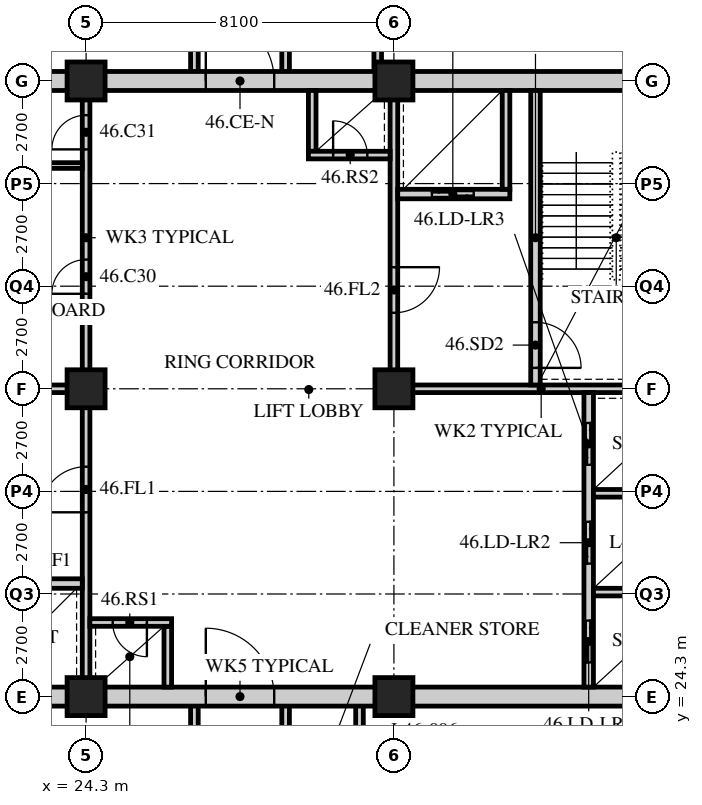
"""IFC4 building model, lengths in metres.
Left out: names, types, materials, properties, quantities, classifications, styles, units other than length and angle.
Written with IfcOpenShell. Run it as: python <this file> out.ifc"""

import sys

from ifc_helpers import new_model, si_unit, direction, frame, frame_2d, origin, origin_2d, place, context, subcontext, project, spatial, rectangle, hollow_rectangle, extrude, element, fill, save


model = new_model("IFC4")
c1 = context("Model", 3, precision=1e-05, world=origin(), true_north=direction((0.0, 1.0)))
c2 = subcontext(c1, "Body", "Model", "MODEL_VIEW")
j1 = project(units=[si_unit("LENGTHUNIT", "METRE"), si_unit("PLANEANGLEUNIT", "RADIAN")], contexts=[c1])
p1 = place(None, origin())
s1 = spatial("IfcSite", under=j1, at=p1, CompositionType="ELEMENT")
p2 = place(p1, origin())
s2 = spatial("IfcBuilding", under=s1, at=p2, CompositionType="ELEMENT")
p3 = place(p2, frame((0.0, 0.0, 181.2)))
s3 = spatial("IfcBuildingStorey", under=s2, at=p3, CompositionType="ELEMENT", Elevation=181.2)
for number, where, z_axis, x_axis in (
    (1, (24.3, 24.3, 0.0), (0.0, 0.0, 1.0), (1.0, 0.0, 0.0)),
    (2, (24.3, 32.4, 0.0), (0.0, 0.0, 1.0), (1.0, 0.0, 0.0)),
    (3, (24.3, 40.5, 0.0), (0.0, 0.0, 1.0), (1.0, 0.0, 0.0)),
    (4, (32.4, 24.3, 0.0), (0.0, 0.0, 1.0), (1.0, 0.0, 0.0)),
    (5, (32.4, 32.4, 0.0), (0.0, 0.0, 1.0), (1.0, 0.0, 0.0)),
    (6, (32.4, 40.5, 0.0), (0.0, 0.0, 1.0), (1.0, 0.0, 0.0)),
):
    element("IfcColumn", number, at=place(p3, frame(where, z_axis=z_axis, x_axis=x_axis)), inside=s3, PredefinedType="COLUMN", context=c2, shape_type="SweptSolid", body=[
        extrude(hollow_rectangle(XDim=1.0, YDim=1.0, WallThickness=0.1, at=origin_2d()), origin(), (0.0, 0.0, 1.0), 3.6),
    ])
for number, where, z_axis, x_axis in (
    (7, (31.494, 20.7, 0.0), (0.0, 0.0, 1.0), (0.0, 1.0, 0.0)),
    (8, (27.15, 20.7, 0.0), (0.0, 0.0, 1.0), (0.0, 1.0, 0.0)),
    (9, (29.55, 20.7, 0.0), (0.0, 0.0, 1.0), (0.0, 1.0, 0.0)),
):
    element("IfcWall", number, at=place(p3, frame(where, z_axis=z_axis, x_axis=x_axis)), inside=s3, PredefinedType="SOLIDWALL", context=c2, shape_type="SweptSolid", body=[
        extrude(rectangle(XDim=3.6, YDim=0.2, at=frame_2d((1.8, 0.0))), origin(), (0.0, 0.0, 1.0), 3.39),
    ])
p4 = place(p3, frame((31.974, 45.45, 0.0), z_axis=(0.0, 0.0, 1.0), x_axis=(0.0, -1.0, 0.0)))
e10 = element("IfcWall", 10, at=p4, inside=s3, PredefinedType="SOLIDWALL", context=c2, shape_type="SweptSolid", body=[
    extrude(rectangle(XDim=4.95, YDim=0.2, at=frame_2d((2.475, 0.0))), origin(), (0.0, 0.0, 1.0), 2.69),
])
for number, where, z_axis, x_axis in (
    (11, (27.15, 40.5, 0.0), (0.0, 0.0, 1.0), (0.0, 1.0, 0.0)),
    (12, (29.55, 40.5, 0.0), (0.0, 0.0, 1.0), (0.0, 1.0, 0.0)),
):
    element("IfcWall", number, at=place(p3, frame(where, z_axis=z_axis, x_axis=x_axis)), inside=s3, PredefinedType="SOLIDWALL", context=c2, shape_type="SweptSolid", body=[
        extrude(rectangle(XDim=4.95, YDim=0.2, at=frame_2d((2.475, 0.0))), origin(), (0.0, 0.0, 1.0), 3.39),
    ])
p5 = place(p3, frame((15.95, 24.3, 0.0), z_axis=(0.0, 0.0, 1.0), x_axis=(1.0, 0.0, 0.0)))
e13 = element("IfcWall", 13, at=p5, inside=s3, PredefinedType="SOLIDWALL", context=c2, shape_type="SweptSolid", body=[
    extrude(rectangle(XDim=24.8, YDim=0.5, at=frame_2d((12.4, 0.0))), origin(), (0.0, 0.0, 1.0), 2.74),
])
p6 = place(p5, frame((11.5, 0.0, 0.0)))
e14 = element("IfcOpeningElement", 14, at=p6, cuts=e13, PredefinedType="OPENING", context=c2, shape_type="SweptSolid", body=[
    extrude(rectangle(XDim=1.8, YDim=2.4, at=frame_2d((0.9, 1.2))), frame((0.0, 0.26, 0.0), z_axis=(0.0, -1.0, 0.0), x_axis=(1.0, 0.0, 0.0)), (0.0, 0.0, 1.0), 0.52),
])
p7 = place(p3, frame((15.95, 40.5, 0.0), z_axis=(0.0, 0.0, 1.0), x_axis=(1.0, 0.0, 0.0)))
e15 = element("IfcWall", 15, at=p7, inside=s3, PredefinedType="SOLIDWALL", context=c2, shape_type="SweptSolid", body=[
    extrude(rectangle(XDim=24.8, YDim=0.5, at=frame_2d((12.4, 0.0))), origin(), (0.0, 0.0, 1.0), 2.74),
])
p8 = place(p7, frame((11.5, 0.0, 0.0)))
e16 = element("IfcOpeningElement", 16, at=p8, cuts=e15, PredefinedType="OPENING", context=c2, shape_type="SweptSolid", body=[
    extrude(rectangle(XDim=1.8, YDim=2.4, at=frame_2d((0.9, 1.2))), frame((0.0, 0.26, 0.0), z_axis=(0.0, -1.0, 0.0), x_axis=(1.0, 0.0, 0.0)), (0.0, 0.0, 1.0), 0.52),
])
p9 = place(p3, frame((16.45, 32.4, 0.0), z_axis=(0.0, 0.0, 1.0), x_axis=(1.0, 0.0, 0.0)))
e17 = element("IfcWall", 17, at=p9, inside=s3, PredefinedType="SOLIDWALL", context=c2, shape_type="SweptSolid", body=[
    extrude(rectangle(XDim=7.95, YDim=0.2, at=frame_2d((3.975, 0.0))), origin(), (0.0, 0.0, 1.0), 2.778),
])
p10 = place(p3, frame((24.3, 24.55, 0.0), z_axis=(0.0, 0.0, 1.0), x_axis=(0.0, 1.0, 0.0)))
e18 = element("IfcWall", 18, at=p10, inside=s3, PredefinedType="SOLIDWALL", context=c2, shape_type="SweptSolid", body=[
    extrude(rectangle(XDim=7.75, YDim=0.2, at=frame_2d((3.875, 0.0))), origin(), (0.0, 0.0, 1.0), 2.778),
])
p11 = place(p10, frame((4.6, 0.0, 0.0)))
e19 = element("IfcOpeningElement", 19, at=p11, cuts=e18, PredefinedType="OPENING", context=c2, shape_type="SweptSolid", body=[
    extrude(rectangle(XDim=1.2, YDim=2.1, at=frame_2d((0.6, 1.05))), frame((0.0, 0.11, 0.0), z_axis=(0.0, -1.0, 0.0), x_axis=(1.0, 0.0, 0.0)), (0.0, 0.0, 1.0), 0.22),
])
p12 = place(p3, frame((21.25, 27.275, 0.0), z_axis=(0.0, 0.0, 1.0), x_axis=(1.0, 0.0, 0.0)))
e20 = element("IfcWall", 20, at=p12, inside=s3, PredefinedType="SOLIDWALL", context=c2, shape_type="SweptSolid", body=[
    extrude(rectangle(XDim=2.95, YDim=0.25, at=frame_2d((1.475, 0.0))), origin(), (0.0, 0.0, 1.0), 3.39),
])
p13 = place(p12, frame((0.95, 0.0, 0.0)))
e21 = element("IfcOpeningElement", 21, at=p13, cuts=e20, PredefinedType="OPENING", context=c2, shape_type="SweptSolid", body=[
    extrude(rectangle(XDim=1.1, YDim=2.4, at=frame_2d((0.55, 1.2))), frame((0.0, 0.135, 0.0), z_axis=(0.0, -1.0, 0.0), x_axis=(1.0, 0.0, 0.0)), (0.0, 0.0, 1.0), 0.27),
])
p14 = place(p3, frame((26.45, 24.55, 0.0), z_axis=(0.0, 0.0, 1.0), x_axis=(0.0, 1.0, 0.0)))
e22 = element("IfcWall", 22, at=p14, inside=s3, PredefinedType="SOLIDWALL", context=c2, shape_type="SweptSolid", body=[
    extrude(rectangle(XDim=1.6, YDim=0.2, at=frame_2d((0.8, 0.0))), origin(), (0.0, 0.0, 1.0), 3.39),
])
p15 = place(p3, frame((24.4, 26.25, 0.0), z_axis=(0.0, 0.0, 1.0), x_axis=(1.0, 0.0, 0.0)))
e23 = element("IfcWall", 23, at=p15, inside=s3, PredefinedType="SOLIDWALL", context=c2, shape_type="SweptSolid", body=[
    extrude(rectangle(XDim=2.15, YDim=0.2, at=frame_2d((1.075, 0.0))), origin(), (0.0, 0.0, 1.0), 3.39),
])
p16 = place(p15, frame((0.6, 0.0, 0.0)))
e24 = element("IfcOpeningElement", 24, at=p16, cuts=e23, PredefinedType="OPENING", context=c2, shape_type="SweptSolid", body=[
    extrude(rectangle(XDim=0.9, YDim=2.1, at=frame_2d((0.45, 1.05))), frame((0.0, 0.11, 0.0), z_axis=(0.0, -1.0, 0.0), x_axis=(1.0, 0.0, 0.0)), (0.0, 0.0, 1.0), 0.22),
])
p17 = place(p3, frame((32.3, 32.4, 0.0), z_axis=(0.0, 0.0, 1.0), x_axis=(1.0, 0.0, 0.0)))
e25 = element("IfcWall", 25, at=p17, inside=s3, PredefinedType="SOLIDWALL", context=c2, shape_type="SweptSolid", body=[
    extrude(rectangle(XDim=7.95, YDim=0.2, at=frame_2d((3.975, 0.0))), origin(), (0.0, 0.0, 1.0), 2.778),
])
p18 = place(p3, frame((32.4, 32.5, 0.0), z_axis=(0.0, 0.0, 1.0), x_axis=(0.0, 1.0, 0.0)))
e26 = element("IfcWall", 26, at=p18, inside=s3, PredefinedType="SOLIDWALL", context=c2, shape_type="SweptSolid", body=[
    extrude(rectangle(XDim=7.75, YDim=0.2, at=frame_2d((3.875, 0.0))), origin(), (0.0, 0.0, 1.0), 2.778),
])
p19 = place(p18, frame((1.9, 0.0, 0.0)))
e27 = element("IfcOpeningElement", 27, at=p19, cuts=e26, PredefinedType="OPENING", context=c2, shape_type="SweptSolid", body=[
    extrude(rectangle(XDim=1.2, YDim=2.1, at=frame_2d((0.6, 1.05))), frame((0.0, 0.11, 0.0), z_axis=(0.0, -1.0, 0.0), x_axis=(1.0, 0.0, 0.0)), (0.0, 0.0, 1.0), 0.22),
])
p20 = place(p3, frame((37.525, 24.55, 0.0), z_axis=(0.0, 0.0, 1.0), x_axis=(0.0, 1.0, 0.0)))
e28 = element("IfcWall", 28, at=p20, inside=s3, PredefinedType="SOLIDWALL", context=c2, shape_type="SweptSolid", body=[
    extrude(rectangle(XDim=7.75, YDim=0.25, at=frame_2d((3.875, 0.0))), origin(), (0.0, 0.0, 1.0), 3.39),
])
p21 = place(p20, frame((0.65, 0.0, 0.0)))
e29 = element("IfcOpeningElement", 29, at=p21, cuts=e28, PredefinedType="OPENING", context=c2, shape_type="SweptSolid", body=[
    extrude(rectangle(XDim=1.1, YDim=2.4, at=frame_2d((0.55, 1.2))), frame((0.0, 0.135, 0.0), z_axis=(0.0, -1.0, 0.0), x_axis=(1.0, 0.0, 0.0)), (0.0, 0.0, 1.0), 0.27),
])
p22 = place(p20, frame((3.25, 0.0, 0.0)))
e30 = element("IfcOpeningElement", 30, at=p22, cuts=e28, PredefinedType="OPENING", context=c2, shape_type="SweptSolid", body=[
    extrude(rectangle(XDim=1.1, YDim=2.4, at=frame_2d((0.55, 1.2))), frame((0.0, 0.135, 0.0), z_axis=(0.0, -1.0, 0.0), x_axis=(1.0, 0.0, 0.0)), (0.0, 0.0, 1.0), 0.27),
])
p23 = place(p20, frame((5.85, 0.0, 0.0)))
e31 = element("IfcOpeningElement", 31, at=p23, cuts=e28, PredefinedType="OPENING", context=c2, shape_type="SweptSolid", body=[
    extrude(rectangle(XDim=1.1, YDim=2.4, at=frame_2d((0.55, 1.2))), frame((0.0, 0.135, 0.0), z_axis=(0.0, -1.0, 0.0), x_axis=(1.0, 0.0, 0.0)), (0.0, 0.0, 1.0), 0.27),
])
for number, where, z_axis, x_axis in (
    (32, (37.65, 27.05, 0.0), (0.0, 0.0, 1.0), (1.0, 0.0, 0.0)),
    (33, (37.65, 29.65, 0.0), (0.0, 0.0, 1.0), (1.0, 0.0, 0.0)),
):
    element("IfcWall", number, at=place(p3, frame(where, z_axis=z_axis, x_axis=x_axis)), inside=s3, PredefinedType="SOLIDWALL", context=c2, shape_type="SweptSolid", body=[
        extrude(rectangle(XDim=2.6, YDim=0.2, at=frame_2d((1.3, 0.0))), origin(), (0.0, 0.0, 1.0), 3.39),
    ])
p24 = place(p3, frame((36.125, 32.5, 0.0), z_axis=(0.0, 0.0, 1.0), x_axis=(0.0, 1.0, 0.0)))
e34 = element("IfcWall", 34, at=p24, inside=s3, PredefinedType="SOLIDWALL", context=c2, shape_type="SweptSolid", body=[
    extrude(rectangle(XDim=7.75, YDim=0.25, at=frame_2d((3.875, 0.0))), origin(), (0.0, 0.0, 1.0), 3.39),
])
p25 = place(p24, frame((0.45, 0.0, 0.0)))
e35 = element("IfcOpeningElement", 35, at=p25, cuts=e34, PredefinedType="OPENING", context=c2, shape_type="SweptSolid", body=[
    extrude(rectangle(XDim=1.2, YDim=2.1, at=frame_2d((0.6, 1.05))), frame((0.0, 0.135, 0.0), z_axis=(0.0, -1.0, 0.0), x_axis=(1.0, 0.0, 0.0)), (0.0, 0.0, 1.0), 0.27),
])
p26 = place(p3, frame((32.5, 37.525, 0.0), z_axis=(0.0, 0.0, 1.0), x_axis=(1.0, 0.0, 0.0)))
e36 = element("IfcWall", 36, at=p26, inside=s3, PredefinedType="SOLIDWALL", context=c2, shape_type="SweptSolid", body=[
    extrude(rectangle(XDim=2.95, YDim=0.25, at=frame_2d((1.475, 0.0))), origin(), (0.0, 0.0, 1.0), 3.39),
])
p27 = place(p26, frame((0.9, 0.0, 0.0)))
e37 = element("IfcOpeningElement", 37, at=p27, cuts=e36, PredefinedType="OPENING", context=c2, shape_type="SweptSolid", body=[
    extrude(rectangle(XDim=1.1, YDim=2.4, at=frame_2d((0.55, 1.2))), frame((0.0, 0.135, 0.0), z_axis=(0.0, -1.0, 0.0), x_axis=(1.0, 0.0, 0.0)), (0.0, 0.0, 1.0), 0.27),
])
p28 = place(p3, frame((35.35, 37.65, 0.0), z_axis=(0.0, 0.0, 1.0), x_axis=(0.0, 1.0, 0.0)))
e38 = element("IfcWall", 38, at=p28, inside=s3, PredefinedType="SOLIDWALL", context=c2, shape_type="SweptSolid", body=[
    extrude(rectangle(XDim=2.6, YDim=0.2, at=frame_2d((1.3, 0.0))), origin(), (0.0, 0.0, 1.0), 3.39),
])
p29 = place(p3, frame((30.25, 38.65, 0.0), z_axis=(0.0, 0.0, 1.0), x_axis=(0.0, 1.0, 0.0)))
e39 = element("IfcWall", 39, at=p29, inside=s3, PredefinedType="SOLIDWALL", context=c2, shape_type="SweptSolid", body=[
    extrude(rectangle(XDim=1.6, YDim=0.2, at=frame_2d((0.8, 0.0))), origin(), (0.0, 0.0, 1.0), 3.39),
])
p30 = place(p3, frame((30.15, 38.55, 0.0), z_axis=(0.0, 0.0, 1.0), x_axis=(1.0, 0.0, 0.0)))
e40 = element("IfcWall", 40, at=p30, inside=s3, PredefinedType="SOLIDWALL", context=c2, shape_type="SweptSolid", body=[
    extrude(rectangle(XDim=2.15, YDim=0.2, at=frame_2d((1.075, 0.0))), origin(), (0.0, 0.0, 1.0), 3.39),
])
p31 = place(p30, frame((0.65, 0.0, 0.0)))
e41 = element("IfcOpeningElement", 41, at=p31, cuts=e40, PredefinedType="OPENING", context=c2, shape_type="SweptSolid", body=[
    extrude(rectangle(XDim=0.9, YDim=2.1, at=frame_2d((0.45, 1.05))), frame((0.0, 0.11, 0.0), z_axis=(0.0, -1.0, 0.0), x_axis=(1.0, 0.0, 0.0)), (0.0, 0.0, 1.0), 0.22),
])
p32 = place(p3, frame((24.3, 32.5, 0.0), z_axis=(0.0, 0.0, 1.0), x_axis=(0.0, 1.0, 0.0)))
e42 = element("IfcWall", 42, at=p32, inside=s3, PredefinedType="PARTITIONING", context=c2, shape_type="SweptSolid", body=[
    extrude(rectangle(XDim=7.75, YDim=0.2, at=frame_2d((3.875, 0.0))), origin(), (0.0, 0.0, 1.0), 2.778),
])
p33 = place(p32, frame((2.4, 0.0, 0.0)))
e43 = element("IfcOpeningElement", 43, at=p33, cuts=e42, PredefinedType="OPENING", context=c2, shape_type="SweptSolid", body=[
    extrude(rectangle(XDim=0.9, YDim=2.1, at=frame_2d((0.45, 1.05))), frame((0.0, 0.11, 0.0), z_axis=(0.0, -1.0, 0.0), x_axis=(1.0, 0.0, 0.0)), (0.0, 0.0, 1.0), 0.22),
])
p34 = place(p32, frame((6.2, 0.0, 0.0)))
e44 = element("IfcOpeningElement", 44, at=p34, cuts=e42, PredefinedType="OPENING", context=c2, shape_type="SweptSolid", body=[
    extrude(rectangle(XDim=0.9, YDim=2.1, at=frame_2d((0.45, 1.05))), frame((0.0, 0.11, 0.0), z_axis=(0.0, -1.0, 0.0), x_axis=(1.0, 0.0, 0.0)), (0.0, 0.0, 1.0), 0.22),
])
p35 = place(p3, frame((16.45, 38.275, 0.0), z_axis=(0.0, 0.0, 1.0), x_axis=(1.0, 0.0, 0.0)))
e45 = element("IfcWall", 45, at=p35, inside=s3, PredefinedType="PARTITIONING", context=c2, shape_type="SweptSolid", body=[
    extrude(rectangle(XDim=7.75, YDim=0.15, at=frame_2d((3.875, 0.0))), origin(), (0.0, 0.0, 1.0), 3.39),
])
p36 = place(p33, origin())
e46 = element("IfcDoor", 46, at=p36, inside=s3, OperationType="SINGLE_SWING_LEFT", PredefinedType="DOOR", context=c2, shape_type="SweptSolid", body=[
    extrude(rectangle(XDim=0.9, YDim=2.1, at=frame_2d((0.45, 1.05))), frame((0.0, 0.025, 0.0), z_axis=(0.0, -1.0, 0.0), x_axis=(1.0, 0.0, 0.0)), (0.0, 0.0, 1.0), 0.05),
])
fill(e43, e46)
p37 = place(p34, origin())
e47 = element("IfcDoor", 47, at=p37, inside=s3, OperationType="SINGLE_SWING_LEFT", PredefinedType="DOOR", context=c2, shape_type="SweptSolid", body=[
    extrude(rectangle(XDim=0.9, YDim=2.1, at=frame_2d((0.45, 1.05))), frame((0.0, 0.025, 0.0), z_axis=(0.0, -1.0, 0.0), x_axis=(1.0, 0.0, 0.0)), (0.0, 0.0, 1.0), 0.05),
])
fill(e44, e47)
p38 = place(p11, origin())
e48 = element("IfcDoor", 48, at=p38, inside=s3, OperationType="SINGLE_SWING_LEFT", PredefinedType="DOOR", context=c2, shape_type="SweptSolid", body=[
    extrude(rectangle(XDim=1.2, YDim=2.1, at=frame_2d((0.6, 1.05))), frame((0.0, 0.025, 0.0), z_axis=(0.0, -1.0, 0.0), x_axis=(1.0, 0.0, 0.0)), (0.0, 0.0, 1.0), 0.05),
])
fill(e19, e48)
p39 = place(p16, origin())
e49 = element("IfcDoor", 49, at=p39, inside=s3, OperationType="SINGLE_SWING_LEFT", PredefinedType="DOOR", context=c2, shape_type="SweptSolid", body=[
    extrude(rectangle(XDim=0.9, YDim=2.1, at=frame_2d((0.45, 1.05))), frame((0.0, 0.025, 0.0), z_axis=(0.0, -1.0, 0.0), x_axis=(1.0, 0.0, 0.0)), (0.0, 0.0, 1.0), 0.05),
])
fill(e24, e49)
p40 = place(p25, origin())
e50 = element("IfcDoor", 50, at=p40, inside=s3, OperationType="SINGLE_SWING_RIGHT", PredefinedType="DOOR", context=c2, shape_type="SweptSolid", body=[
    extrude(rectangle(XDim=1.2, YDim=2.1, at=frame_2d((0.6, 1.05))), frame((0.0, 0.025, 0.0), z_axis=(0.0, -1.0, 0.0), x_axis=(1.0, 0.0, 0.0)), (0.0, 0.0, 1.0), 0.05),
])
fill(e35, e50)
p41 = place(p19, origin())
e51 = element("IfcDoor", 51, at=p41, inside=s3, OperationType="SINGLE_SWING_LEFT", PredefinedType="DOOR", context=c2, shape_type="SweptSolid", body=[
    extrude(rectangle(XDim=1.2, YDim=2.1, at=frame_2d((0.6, 1.05))), frame((0.0, 0.025, 0.0), z_axis=(0.0, -1.0, 0.0), x_axis=(1.0, 0.0, 0.0)), (0.0, 0.0, 1.0), 0.05),
])
fill(e27, e51)
p42 = place(p31, origin())
e52 = element("IfcDoor", 52, at=p42, inside=s3, OperationType="SINGLE_SWING_LEFT", PredefinedType="DOOR", context=c2, shape_type="SweptSolid", body=[
    extrude(rectangle(XDim=0.9, YDim=2.1, at=frame_2d((0.45, 1.05))), frame((0.0, 0.025, 0.0), z_axis=(0.0, -1.0, 0.0), x_axis=(1.0, 0.0, 0.0)), (0.0, 0.0, 1.0), 0.05),
])
fill(e41, e52)
p43 = place(p21, origin())
e53 = element("IfcDoor", 53, at=p43, inside=s3, OperationType="DOUBLE_DOOR_SLIDING", PredefinedType="DOOR", context=c2, shape_type="SweptSolid", body=[
    extrude(rectangle(XDim=1.1, YDim=2.4, at=frame_2d((0.55, 1.2))), frame((0.0, 0.025, 0.0), z_axis=(0.0, -1.0, 0.0), x_axis=(1.0, 0.0, 0.0)), (0.0, 0.0, 1.0), 0.05),
])
fill(e29, e53)
p44 = place(p22, origin())
e54 = element("IfcDoor", 54, at=p44, inside=s3, OperationType="DOUBLE_DOOR_SLIDING", PredefinedType="DOOR", context=c2, shape_type="SweptSolid", body=[
    extrude(rectangle(XDim=1.1, YDim=2.4, at=frame_2d((0.55, 1.2))), frame((0.0, 0.025, 0.0), z_axis=(0.0, -1.0, 0.0), x_axis=(1.0, 0.0, 0.0)), (0.0, 0.0, 1.0), 0.05),
])
fill(e30, e54)
p45 = place(p23, origin())
e55 = element("IfcDoor", 55, at=p45, inside=s3, OperationType="DOUBLE_DOOR_SLIDING", PredefinedType="DOOR", context=c2, shape_type="SweptSolid", body=[
    extrude(rectangle(XDim=1.1, YDim=2.4, at=frame_2d((0.55, 1.2))), frame((0.0, 0.025, 0.0), z_axis=(0.0, -1.0, 0.0), x_axis=(1.0, 0.0, 0.0)), (0.0, 0.0, 1.0), 0.05),
])
fill(e31, e55)
p46 = place(p27, origin())
e56 = element("IfcDoor", 56, at=p46, inside=s3, OperationType="DOUBLE_DOOR_SLIDING", PredefinedType="DOOR", context=c2, shape_type="SweptSolid", body=[
    extrude(rectangle(XDim=1.1, YDim=2.4, at=frame_2d((0.55, 1.2))), frame((0.0, 0.025, 0.0), z_axis=(0.0, -1.0, 0.0), x_axis=(1.0, 0.0, 0.0)), (0.0, 0.0, 1.0), 0.05),
])
fill(e37, e56)
p47 = place(p6, origin())
e57 = element("IfcDoor", 57, at=p47, inside=s3, OperationType="DOUBLE_DOOR_SINGLE_SWING", PredefinedType="DOOR", context=c2, shape_type="SweptSolid", body=[
    extrude(rectangle(XDim=1.8, YDim=2.4, at=frame_2d((0.9, 1.2))), frame((0.0, 0.025, 0.0), z_axis=(0.0, -1.0, 0.0), x_axis=(1.0, 0.0, 0.0)), (0.0, 0.0, 1.0), 0.05),
])
fill(e14, e57)
p48 = place(p8, origin())
e58 = element("IfcDoor", 58, at=p48, inside=s3, OperationType="DOUBLE_DOOR_SINGLE_SWING", PredefinedType="DOOR", context=c2, shape_type="SweptSolid", body=[
    extrude(rectangle(XDim=1.8, YDim=2.4, at=frame_2d((0.9, 1.2))), frame((0.0, 0.025, 0.0), z_axis=(0.0, -1.0, 0.0), x_axis=(1.0, 0.0, 0.0)), (0.0, 0.0, 1.0), 0.05),
])
fill(e16, e58)
save(model, sys.argv[1])
